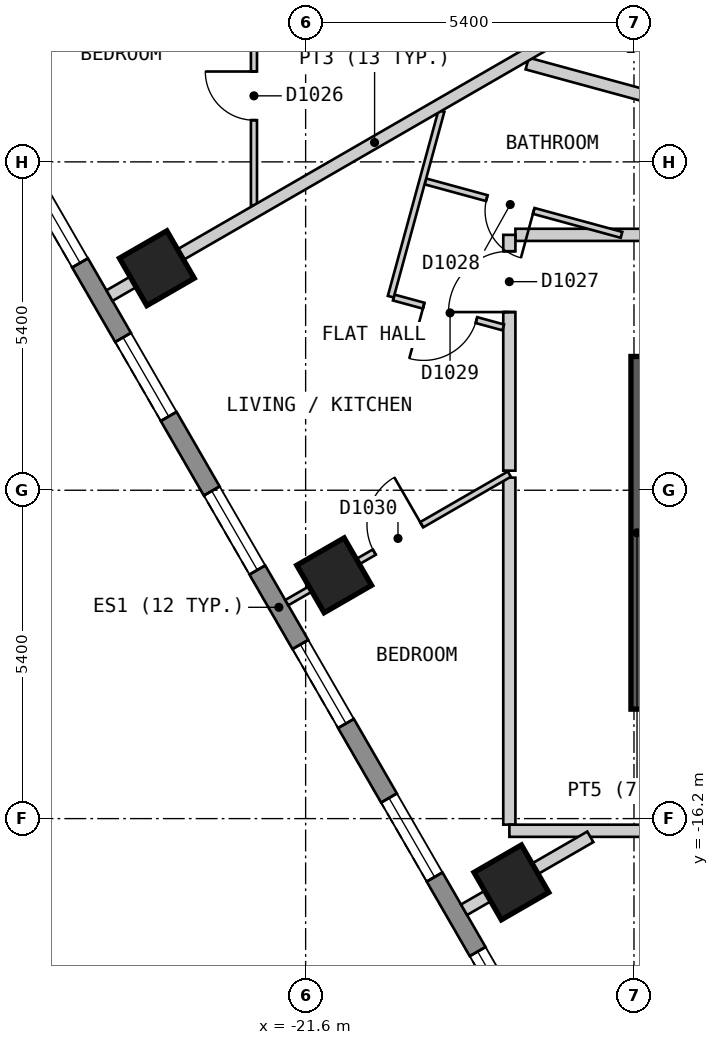
"""IFC4 building model, lengths in metres.
Left out: names, types, materials, properties, quantities, classifications, styles, units other than length and angle.
Written with IfcOpenShell. Run it as: python <this file> out.ifc"""

import sys

from ifc_helpers import new_model, si_unit, direction, frame, frame_2d, origin, origin_2d, place, context, subcontext, project, spatial, polyline, rectangle, outline, extrude, element, fill, save


model = new_model("IFC4")
c1 = context("Model", 3, precision=1e-05, world=origin(), true_north=direction((0.0, 1.0)))
c2 = subcontext(c1, "Body", "Model", "MODEL_VIEW")
j1 = project(units=[si_unit("LENGTHUNIT", "METRE"), si_unit("PLANEANGLEUNIT", "RADIAN")], contexts=[c1])
p1 = place(None, origin())
s1 = spatial("IfcSite", under=j1, at=p1, CompositionType="ELEMENT")
p2 = place(p1, origin())
s2 = spatial("IfcBuilding", under=s1, at=p2, CompositionType="ELEMENT")
p3 = place(p2, frame((0.0, 0.0, 120.6)))
s3 = spatial("IfcBuildingStorey", under=s2, at=p3, CompositionType="ELEMENT", Elevation=120.6)
for number, where, z_axis, x_axis in (
    (1, (-24.047, -7.149, 0.0), (0.0, 0.0, 1.0), (0.5, -0.866, 0.0)),
    (2, (-21.131, -12.199, 0.0), (0.0, 0.0, 1.0), (0.5, -0.866, 0.0)),
    (3, (-18.216, -17.249, 0.0), (0.0, 0.0, 1.0), (0.5, -0.866, 0.0)),
):
    element("IfcColumn", number, at=place(p3, frame(where, z_axis=z_axis, x_axis=x_axis)), inside=s3, PredefinedType="COLUMN", context=c2, shape_type="SweptSolid", body=[
        extrude(rectangle(XDim=0.9, YDim=0.9, at=origin_2d()), origin(), (0.0, 0.0, 1.0), 3.0),
    ])
p4 = place(p3, frame((-28.218, -2.025, 0.0), z_axis=(0.0, 0.0, 1.0), x_axis=(0.500017503135, -0.866015298109, 0.0)))
e4 = element("IfcWall", 4, at=p4, inside=s3, PredefinedType="SOLIDWALL", context=c2, shape_type="SweptSolid", body=[
    extrude(outline(polyline([(0.0, -0.15), (24.711, -0.15), (24.631, 0.15), (0.08, 0.15), (0.0, -0.15)])), origin(), (0.0, 0.0, 1.0), 2.7),
])
p5 = place(p4, frame((1.4, 0.0, 0.15)))
e5 = element("IfcOpeningElement", 5, at=p5, cuts=e4, PredefinedType="OPENING", context=c2, shape_type="SweptSolid", body=[
    extrude(rectangle(XDim=1.5, YDim=2.1, at=frame_2d((0.75, 1.05))), frame((0.0, 0.16, 0.0), z_axis=(0.0, -1.0, 0.0), x_axis=(1.0, 0.0, 0.0)), (0.0, 0.0, 1.0), 0.32),
])
p6 = place(p4, frame((4.316, 0.0, 0.15)))
e6 = element("IfcOpeningElement", 6, at=p6, cuts=e4, PredefinedType="OPENING", context=c2, shape_type="SweptSolid", body=[
    extrude(rectangle(XDim=1.5, YDim=2.1, at=frame_2d((0.75, 1.05))), frame((0.0, 0.16, 0.0), z_axis=(0.0, -1.0, 0.0), x_axis=(1.0, 0.0, 0.0)), (0.0, 0.0, 1.0), 0.32),
])
p7 = place(p4, frame((7.231, 0.0, 0.15)))
e7 = element("IfcOpeningElement", 7, at=p7, cuts=e4, PredefinedType="OPENING", context=c2, shape_type="SweptSolid", body=[
    extrude(rectangle(XDim=1.5, YDim=2.1, at=frame_2d((0.75, 1.05))), frame((0.0, 0.16, 0.0), z_axis=(0.0, -1.0, 0.0), x_axis=(1.0, 0.0, 0.0)), (0.0, 0.0, 1.0), 0.32),
])
p8 = place(p4, frame((10.147, 0.0, 0.15)))
e8 = element("IfcOpeningElement", 8, at=p8, cuts=e4, PredefinedType="OPENING", context=c2, shape_type="SweptSolid", body=[
    extrude(rectangle(XDim=1.5, YDim=2.1, at=frame_2d((0.75, 1.05))), frame((0.0, 0.16, 0.0), z_axis=(0.0, -1.0, 0.0), x_axis=(1.0, 0.0, 0.0)), (0.0, 0.0, 1.0), 0.32),
])
p9 = place(p4, frame((13.062, 0.0, 0.15)))
e9 = element("IfcOpeningElement", 9, at=p9, cuts=e4, PredefinedType="OPENING", context=c2, shape_type="SweptSolid", body=[
    extrude(rectangle(XDim=1.5, YDim=2.1, at=frame_2d((0.75, 1.05))), frame((0.0, 0.16, 0.0), z_axis=(0.0, -1.0, 0.0), x_axis=(1.0, 0.0, 0.0)), (0.0, 0.0, 1.0), 0.32),
])
p10 = place(p4, frame((15.977, 0.0, 0.15)))
e10 = element("IfcOpeningElement", 10, at=p10, cuts=e4, PredefinedType="OPENING", context=c2, shape_type="SweptSolid", body=[
    extrude(rectangle(XDim=1.5, YDim=2.1, at=frame_2d((0.75, 1.05))), frame((0.0, 0.16, 0.0), z_axis=(0.0, -1.0, 0.0), x_axis=(1.0, 0.0, 0.0)), (0.0, 0.0, 1.0), 0.32),
])
p11 = place(p4, frame((18.893, 0.0, 0.15)))
e11 = element("IfcOpeningElement", 11, at=p11, cuts=e4, PredefinedType="OPENING", context=c2, shape_type="SweptSolid", body=[
    extrude(rectangle(XDim=1.5, YDim=2.1, at=frame_2d((0.75, 1.05))), frame((0.0, 0.16, 0.0), z_axis=(0.0, -1.0, 0.0), x_axis=(1.0, 0.0, 0.0)), (0.0, 0.0, 1.0), 0.32),
])
p12 = place(p4, frame((21.809, 0.0, 0.15)))
e12 = element("IfcOpeningElement", 12, at=p12, cuts=e4, PredefinedType="OPENING", context=c2, shape_type="SweptSolid", body=[
    extrude(rectangle(XDim=1.5, YDim=2.1, at=frame_2d((0.75, 1.05))), frame((0.0, 0.16, 0.0), z_axis=(0.0, -1.0, 0.0), x_axis=(1.0, 0.0, 0.0)), (0.0, 0.0, 1.0), 0.32),
])
p13 = place(p3, frame((-18.25, -10.593, 0.0), z_axis=(0.0, 0.0, 1.0), x_axis=(0.0, -1.0, 0.0)))
e13 = element("IfcWall", 13, at=p13, inside=s3, PredefinedType="PARTITIONING", context=c2, shape_type="SweptSolid", body=[
    extrude(rectangle(XDim=5.706, YDim=0.2, at=frame_2d((2.853, 0.0))), origin(), (0.0, 0.0, 1.0), 2.7),
])
p14 = place(p3, frame((-18.15, -6.6, 0.0), z_axis=(0.0, 0.0, 1.0), x_axis=(1.0, 0.0, 0.0)))
e14 = element("IfcWall", 14, at=p14, inside=s3, PredefinedType="PARTITIONING", context=c2, shape_type="SweptSolid", body=[
    extrude(rectangle(XDim=2.55, YDim=0.2, at=frame_2d((1.275, 0.0))), origin(), (0.0, 0.0, 1.0), 2.7),
])
p15 = place(p3, frame((-18.249, -16.4, 0.0), z_axis=(0.0, 0.0, 1.0), x_axis=(1.0, 0.0, 0.0)))
e15 = element("IfcWall", 15, at=p15, inside=s3, PredefinedType="PARTITIONING", context=c2, shape_type="SweptSolid", body=[
    extrude(rectangle(XDim=2.749, YDim=0.2, at=frame_2d((1.375, 0.0))), origin(), (0.0, 0.0, 1.0), 2.7),
])
p16 = place(p3, frame((-18.25, -10.478, 0.0), z_axis=(0.0, 0.0, 1.0), x_axis=(0.0, 1.0, 0.0)))
e16 = element("IfcWall", 16, at=p16, inside=s3, PredefinedType="PARTITIONING", context=c2, shape_type="SweptSolid", body=[
    extrude(rectangle(XDim=3.878, YDim=0.2, at=frame_2d((1.939, 0.0))), origin(), (0.0, 0.0, 1.0), 2.7),
])
p17 = place(p16, frame((2.608, 0.0, 0.0)))
e17 = element("IfcOpeningElement", 17, at=p17, cuts=e16, PredefinedType="OPENING", context=c2, shape_type="SweptSolid", body=[
    extrude(rectangle(XDim=1.0, YDim=2.1, at=frame_2d((0.5, 1.05))), frame((0.0, 0.11, 0.0), z_axis=(0.0, -1.0, 0.0), x_axis=(1.0, 0.0, 0.0)), (0.0, 0.0, 1.0), 0.22),
])
p18 = place(p3, frame((-19.631, -5.721, 0.0), z_axis=(0.0, 0.0, 1.0), x_axis=(0.964816035809, -0.262925877475, 0.0)))
e18 = element("IfcWall", 18, at=p18, inside=s3, PredefinedType="PARTITIONING", context=c2, shape_type="SweptSolid", body=[
    extrude(rectangle(XDim=3.344, YDim=0.1, at=frame_2d((1.672, 0.0))), origin(), (0.0, 0.0, 1.0), 2.7),
])
p19 = place(p18, frame((1.047, 0.0, 0.0)))
e19 = element("IfcOpeningElement", 19, at=p19, cuts=e18, PredefinedType="OPENING", context=c2, shape_type="SweptSolid", body=[
    extrude(rectangle(XDim=0.8, YDim=2.1, at=frame_2d((0.4, 1.05))), frame((0.0, 0.06, 0.0), z_axis=(0.0, -1.0, 0.0), x_axis=(1.0, 0.0, 0.0)), (0.0, 0.0, 1.0), 0.12),
])
p20 = place(p3, frame((-20.151, -7.631, 0.0), z_axis=(0.0, 0.0, 1.0), x_axis=(0.964784947449, -0.263039930765, 0.0)))
e20 = element("IfcWall", 20, at=p20, inside=s3, PredefinedType="PARTITIONING", context=c2, shape_type="SweptSolid", body=[
    extrude(rectangle(XDim=1.866, YDim=0.1, at=frame_2d((0.933, 0.0))), origin(), (0.0, 0.0, 1.0), 2.7),
])
p21 = place(p20, frame((0.51, 0.0, 0.0)))
e21 = element("IfcOpeningElement", 21, at=p21, cuts=e20, PredefinedType="OPENING", context=c2, shape_type="SweptSolid", body=[
    extrude(rectangle(XDim=0.9, YDim=2.1, at=frame_2d((0.45, 1.05))), frame((0.0, 0.06, 0.0), z_axis=(0.0, -1.0, 0.0), x_axis=(1.0, 0.0, 0.0)), (0.0, 0.0, 1.0), 0.12),
])
p22 = place(p3, frame((-20.2, -7.617, 0.0), z_axis=(0.0, 0.0, 1.0), x_axis=(0.263150035392, 0.964754921663, 0.0)))
e22 = element("IfcWall", 22, at=p22, inside=s3, PredefinedType="PARTITIONING", context=c2, shape_type="SweptSolid", body=[
    extrude(rectangle(XDim=3.166, YDim=0.1, at=frame_2d((1.583, 0.0))), origin(), (0.0, 0.0, 1.0), 2.7),
])
p23 = place(p3, frame((-22.45, -6.112, 0.0), z_axis=(0.0, 0.0, 1.0), x_axis=(0.0, 1.0, 0.0)))
e23 = element("IfcWall", 23, at=p23, inside=s3, PredefinedType="PARTITIONING", context=c2, shape_type="SweptSolid", body=[
    extrude(rectangle(XDim=3.712, YDim=0.1, at=frame_2d((1.856, 0.0))), origin(), (0.0, 0.0, 1.0), 2.7),
])
p24 = place(p23, frame((1.398, 0.0, 0.0)))
e24 = element("IfcOpeningElement", 24, at=p24, cuts=e23, PredefinedType="OPENING", context=c2, shape_type="SweptSolid", body=[
    extrude(rectangle(XDim=0.8, YDim=2.1, at=frame_2d((0.4, 1.05))), frame((0.0, 0.06, 0.0), z_axis=(0.0, -1.0, 0.0), x_axis=(1.0, 0.0, 0.0)), (0.0, 0.0, 1.0), 0.12),
])
p25 = place(p3, frame((-21.911, -12.649, 0.0), z_axis=(0.0, 0.0, 1.0), x_axis=(0.865984571374, 0.500070717141, 0.0)))
e25 = element("IfcWall", 25, at=p25, inside=s3, PredefinedType="PARTITIONING", context=c2, shape_type="SweptSolid", body=[
    extrude(rectangle(XDim=4.228, YDim=0.1, at=frame_2d((2.114, 0.0))), origin(), (0.0, 0.0, 1.0), 2.7),
])
p26 = place(p25, frame((1.663, 0.0, 0.0)))
e26 = element("IfcOpeningElement", 26, at=p26, cuts=e25, PredefinedType="OPENING", context=c2, shape_type="SweptSolid", body=[
    extrude(rectangle(XDim=0.9, YDim=2.1, at=frame_2d((0.45, 1.05))), frame((0.0, 0.06, 0.0), z_axis=(0.0, -1.0, 0.0), x_axis=(1.0, 0.0, 0.0)), (0.0, 0.0, 1.0), 0.12),
])
p27 = place(p3, frame((-17.956, -3.783, 0.0), z_axis=(0.0, 0.0, 1.0), x_axis=(0.964815336827, -0.2629284424, 0.0)))
e27 = element("IfcWall", 27, at=p27, inside=s3, PredefinedType="PARTITIONING", context=c2, shape_type="SweptSolid", body=[
    extrude(rectangle(XDim=2.514, YDim=0.2, at=frame_2d((1.257, 0.0))), origin(), (0.0, 0.0, 1.0), 2.7),
])
p28 = place(p3, frame((-18.995, -17.699, 0.0), z_axis=(0.0, 0.0, 1.0), x_axis=(0.86607371389, 0.499916315105, 0.0)))
e28 = element("IfcWall", 28, at=p28, inside=s3, PredefinedType="PARTITIONING", context=c2, shape_type="SweptSolid", body=[
    extrude(rectangle(XDim=2.398, YDim=0.2, at=frame_2d((1.199, 0.0))), origin(), (0.0, 0.0, 1.0), 2.7),
])
p29 = place(p3, frame((-24.826, -7.599, 0.0), z_axis=(0.0, 0.0, 1.0), x_axis=(0.86599621094, 0.500050560081, 0.0)))
e29 = element("IfcWall", 29, at=p29, inside=s3, PredefinedType="PARTITIONING", context=c2, shape_type="SweptSolid", body=[
    extrude(rectangle(XDim=10.069, YDim=0.2, at=frame_2d((5.035, 0.0))), origin(), (0.0, 0.0, 1.0), 2.7),
])
p30 = place(p3, frame((-16.15, -14.4, 0.0), z_axis=(0.0, 0.0, 1.0), x_axis=(0.0, 1.0, 0.0)))
e30 = element("IfcWall", 30, at=p30, inside=s3, PredefinedType="SOLIDWALL", context=c2, shape_type="SweptSolid", body=[
    extrude(rectangle(XDim=5.8, YDim=0.2, at=frame_2d((2.9, 0.0))), origin(), (0.0, 0.0, 1.0), 2.7),
])
p31 = place(p6, origin())
e31 = element("IfcWindow", 31, at=p31, inside=s3, PartitioningType="SINGLE_PANEL", PredefinedType="WINDOW", context=c2, shape_type="SweptSolid", body=[
    extrude(rectangle(XDim=1.5, YDim=2.1, at=frame_2d((0.75, 1.05))), frame((0.0, 0.03, 0.0), z_axis=(0.0, -1.0, 0.0), x_axis=(1.0, 0.0, 0.0)), (0.0, 0.0, 1.0), 0.06),
])
fill(e6, e31)
p32 = place(p7, origin())
e32 = element("IfcWindow", 32, at=p32, inside=s3, PartitioningType="SINGLE_PANEL", PredefinedType="WINDOW", context=c2, shape_type="SweptSolid", body=[
    extrude(rectangle(XDim=1.5, YDim=2.1, at=frame_2d((0.75, 1.05))), frame((0.0, 0.03, 0.0), z_axis=(0.0, -1.0, 0.0), x_axis=(1.0, 0.0, 0.0)), (0.0, 0.0, 1.0), 0.06),
])
fill(e7, e32)
p33 = place(p8, origin())
e33 = element("IfcWindow", 33, at=p33, inside=s3, PartitioningType="SINGLE_PANEL", PredefinedType="WINDOW", context=c2, shape_type="SweptSolid", body=[
    extrude(rectangle(XDim=1.5, YDim=2.1, at=frame_2d((0.75, 1.05))), frame((0.0, 0.03, 0.0), z_axis=(0.0, -1.0, 0.0), x_axis=(1.0, 0.0, 0.0)), (0.0, 0.0, 1.0), 0.06),
])
fill(e8, e33)
p34 = place(p9, origin())
e34 = element("IfcWindow", 34, at=p34, inside=s3, PartitioningType="SINGLE_PANEL", PredefinedType="WINDOW", context=c2, shape_type="SweptSolid", body=[
    extrude(rectangle(XDim=1.5, YDim=2.1, at=frame_2d((0.75, 1.05))), frame((0.0, 0.03, 0.0), z_axis=(0.0, -1.0, 0.0), x_axis=(1.0, 0.0, 0.0)), (0.0, 0.0, 1.0), 0.06),
])
fill(e9, e34)
p35 = place(p10, origin())
e35 = element("IfcWindow", 35, at=p35, inside=s3, PartitioningType="SINGLE_PANEL", PredefinedType="WINDOW", context=c2, shape_type="SweptSolid", body=[
    extrude(rectangle(XDim=1.5, YDim=2.1, at=frame_2d((0.75, 1.05))), frame((0.0, 0.03, 0.0), z_axis=(0.0, -1.0, 0.0), x_axis=(1.0, 0.0, 0.0)), (0.0, 0.0, 1.0), 0.06),
])
fill(e10, e35)
p36 = place(p11, origin())
e36 = element("IfcWindow", 36, at=p36, inside=s3, PartitioningType="SINGLE_PANEL", PredefinedType="WINDOW", context=c2, shape_type="SweptSolid", body=[
    extrude(rectangle(XDim=1.5, YDim=2.1, at=frame_2d((0.75, 1.05))), frame((0.0, 0.03, 0.0), z_axis=(0.0, -1.0, 0.0), x_axis=(1.0, 0.0, 0.0)), (0.0, 0.0, 1.0), 0.06),
])
fill(e11, e36)
p37 = place(p24, origin())
e37 = element("IfcDoor", 37, at=p37, inside=s3, OperationType="SINGLE_SWING_RIGHT", PredefinedType="DOOR", context=c2, shape_type="SweptSolid", body=[
    extrude(rectangle(XDim=0.8, YDim=2.1, at=frame_2d((0.4, 1.05))), frame((0.0, 0.025, 0.0), z_axis=(0.0, -1.0, 0.0), x_axis=(1.0, 0.0, 0.0)), (0.0, 0.0, 1.0), 0.05),
])
fill(e24, e37)
p38 = place(p17, origin())
e38 = element("IfcDoor", 38, at=p38, inside=s3, OperationType="SINGLE_SWING_LEFT", PredefinedType="DOOR", context=c2, shape_type="SweptSolid", body=[
    extrude(rectangle(XDim=1.0, YDim=2.1, at=frame_2d((0.5, 1.05))), frame((0.0, 0.025, 0.0), z_axis=(0.0, -1.0, 0.0), x_axis=(1.0, 0.0, 0.0)), (0.0, 0.0, 1.0), 0.05),
])
fill(e17, e38)
p39 = place(p19, origin())
e39 = element("IfcDoor", 39, at=p39, inside=s3, OperationType="SINGLE_SWING_RIGHT", PredefinedType="DOOR", context=c2, shape_type="SweptSolid", body=[
    extrude(rectangle(XDim=0.8, YDim=2.1, at=frame_2d((0.4, 1.05))), frame((0.0, 0.025, 0.0), z_axis=(0.0, -1.0, 0.0), x_axis=(1.0, 0.0, 0.0)), (0.0, 0.0, 1.0), 0.05),
])
fill(e19, e39)
p40 = place(p21, origin())
e40 = element("IfcDoor", 40, at=p40, inside=s3, OperationType="SINGLE_SWING_LEFT", PredefinedType="DOOR", context=c2, shape_type="SweptSolid", body=[
    extrude(rectangle(XDim=0.9, YDim=2.1, at=frame_2d((0.45, 1.05))), frame((0.0, 0.025, 0.0), z_axis=(0.0, -1.0, 0.0), x_axis=(1.0, 0.0, 0.0)), (0.0, 0.0, 1.0), 0.05),
])
fill(e21, e40)
p41 = place(p26, origin())
e41 = element("IfcDoor", 41, at=p41, inside=s3, OperationType="SINGLE_SWING_RIGHT", PredefinedType="DOOR", context=c2, shape_type="SweptSolid", body=[
    extrude(rectangle(XDim=0.9, YDim=2.1, at=frame_2d((0.45, 1.05))), frame((0.0, 0.025, 0.0), z_axis=(0.0, -1.0, 0.0), x_axis=(1.0, 0.0, 0.0)), (0.0, 0.0, 1.0), 0.05),
])
fill(e26, e41)
save(model, sys.argv[1])
